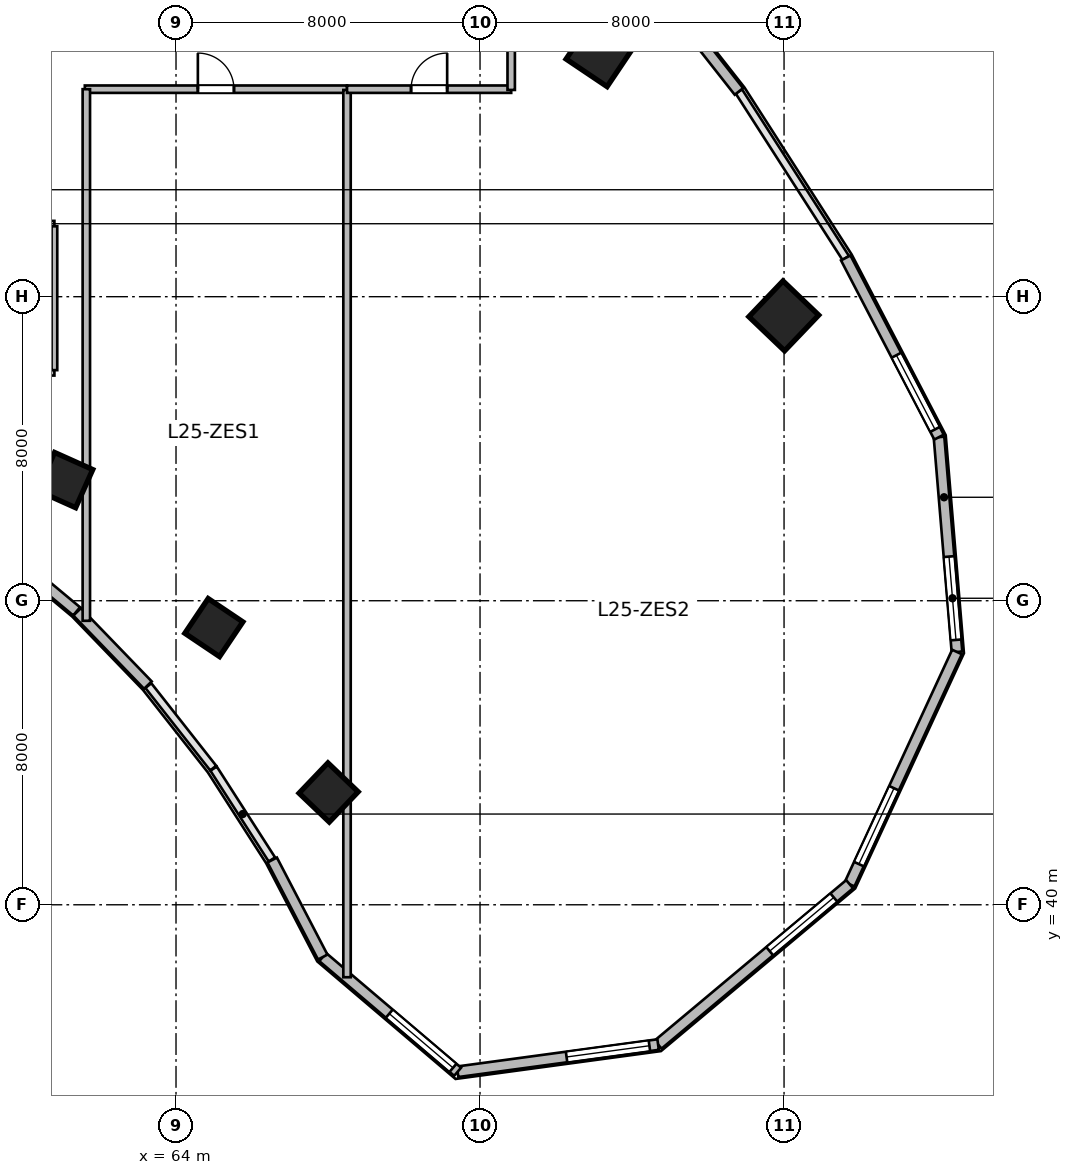
"""IFC4 building model, lengths in metres.
Left out: names, types, materials, properties, quantities, classifications, styles, units other than length and angle.
Written with IfcOpenShell. Run it as: python <this file> out.ifc"""

import sys

from ifc_helpers import new_model, si_unit, direction, frame, frame_2d, origin, origin_2d, place, context, subcontext, project, spatial, rectangle, extrude, source, transform, mapped, element, fill, save


model = new_model("IFC4")
c1 = context("Model", 3, precision=1e-05, world=origin(), true_north=direction((0.0, 1.0)))
c2 = subcontext(c1, "Body", "Model", "MODEL_VIEW")
j1 = project(units=[si_unit("LENGTHUNIT", "METRE"), si_unit("PLANEANGLEUNIT", "RADIAN")], contexts=[c1])
p1 = place(None, origin())
s1 = spatial("IfcSite", under=j1, at=p1, CompositionType="ELEMENT")
p2 = place(p1, origin())
s2 = spatial("IfcBuilding", under=s1, at=p2, CompositionType="ELEMENT")
p3 = place(p2, frame((0.0, 0.0, 107.7)))
s3 = spatial("IfcBuildingStorey", under=s2, at=p3, CompositionType="ELEMENT", Elevation=107.7)
m1 = source(origin(), c2, "Body", "SweptSolid", [
    extrude(rectangle(XDim=1.1, YDim=1.1, at=origin_2d()), origin(), (0.0, 0.0, 1.0), 3.9),
])
for number, where, z_axis, x_axis in (
    (1, (61.082, 51.175, 0.0), (0.0, 0.0, 1.0), (0.409, 0.912, 0.0)),
    (2, (64.996, 47.294, 0.0), (0.0, 0.0, 1.0), (0.558, 0.83, 0.0)),
):
    element("IfcColumn", number, at=place(p3, frame(where, z_axis=z_axis, x_axis=x_axis)), inside=s3, PredefinedType="COLUMN", context=c2, shape_type="MappedRepresentation", body=[
        mapped(m1, transform((0.0, 0.0, 0.0), scale=1.0)),
    ])
m2 = source(origin(), c2, "Body", "SweptSolid", [
    extrude(rectangle(XDim=1.3, YDim=1.3, at=origin_2d()), origin(), (0.0, 0.0, 1.0), 3.9),
])
p4 = place(p3, frame((75.167, 62.43, 0.0), z_axis=(0.0, 0.0, 1.0), x_axis=(0.55774510898, 0.830012285095, 0.0)))
e3 = element("IfcColumn", 3, at=p4, inside=s3, PredefinedType="COLUMN", context=c2, shape_type="MappedRepresentation", body=[
    mapped(m2, transform((0.0, 0.0, 0.0), scale=1.0)),
])
p5 = place(p3, frame((68.015, 42.955, 0.0), z_axis=(0.0, 0.0, 1.0), x_axis=(0.690756218984, 0.723087716626, 0.0)))
e4 = element("IfcColumn", 4, at=p5, inside=s3, PredefinedType="COLUMN", context=c2, shape_type="MappedRepresentation", body=[
    mapped(m1, transform((0.0, 0.0, 0.0), scale=1.0)),
])
p6 = place(p3, frame((79.993, 55.494, 0.0), z_axis=(0.0, 0.0, 1.0), x_axis=(0.690756218984, 0.723087716626, 0.0)))
e5 = element("IfcColumn", 5, at=p6, inside=s3, PredefinedType="COLUMN", context=c2, shape_type="MappedRepresentation", body=[
    mapped(m2, transform((0.0, 0.0, 0.0), scale=1.0)),
])
m3 = source(origin(), c2, "Body", "SweptSolid", [
    extrude(rectangle(XDim=5.674, YDim=0.28, at=frame_2d((2.837, 0.0))), origin(), (0.0, 0.0, 1.0), 3.65),
])
p7 = place(p3, frame((84.078, 52.305, 0.0), z_axis=(0.0, 0.0, 1.0), x_axis=(0.083309007867, -0.996523762491, 0.0)))
e6 = element("IfcWall", 6, at=p7, inside=s3, PredefinedType="SOLIDWALL", context=c2, shape_type="MappedRepresentation", body=[
    mapped(m3, transform((0.0, 0.0, 0.0), scale=1.0)),
])
p8 = place(p7, frame((3.155, 0.0, 0.95)))
e7 = element("IfcOpeningElement", 7, at=p8, cuts=e6, PredefinedType="OPENING", context=c2, shape_type="SweptSolid", body=[
    extrude(rectangle(XDim=2.2, YDim=2.1, at=frame_2d((1.1, 1.05))), frame((0.0, 0.15, 0.0), z_axis=(0.0, -1.0, 0.0), x_axis=(1.0, 0.0, 0.0)), (0.0, 0.0, 1.0), 0.3),
])
m4 = source(origin(), c2, "Body", "SweptSolid", [
    extrude(rectangle(XDim=6.732, YDim=0.28, at=frame_2d((3.366, 0.0))), origin(), (0.0, 0.0, 1.0), 3.65),
])
p9 = place(p3, frame((84.55, 46.652, 0.0), z_axis=(0.0, 0.0, 1.0), x_axis=(-0.419644552709, -0.907688520023, 0.0)))
e8 = element("IfcWall", 8, at=p9, inside=s3, PredefinedType="SOLIDWALL", context=c2, shape_type="MappedRepresentation", body=[
    mapped(m4, transform((0.0, 0.0, 0.0), scale=1.0)),
])
p10 = place(p9, frame((3.949, 0.0, 0.95)))
e9 = element("IfcOpeningElement", 9, at=p10, cuts=e8, PredefinedType="OPENING", context=c2, shape_type="SweptSolid", body=[
    extrude(rectangle(XDim=2.2, YDim=2.1, at=frame_2d((1.1, 1.05))), frame((0.0, 0.15, 0.0), z_axis=(0.0, -1.0, 0.0), x_axis=(1.0, 0.0, 0.0)), (0.0, 0.0, 1.0), 0.3),
])
m5 = source(origin(), c2, "Body", "SweptSolid", [
    extrude(rectangle(XDim=6.573, YDim=0.28, at=frame_2d((3.287, 0.0))), origin(), (0.0, 0.0, 1.0), 3.65),
])
p11 = place(p3, frame((81.725, 40.541, 0.0), z_axis=(0.0, 0.0, 1.0), x_axis=(-0.766715154163, -0.641987439423, 0.0)))
e10 = element("IfcWall", 10, at=p11, inside=s3, PredefinedType="SOLIDWALL", context=c2, shape_type="MappedRepresentation", body=[
    mapped(m5, transform((0.0, 0.0, 0.0), scale=1.0)),
])
p12 = place(p11, frame((0.543, 0.0, 0.95)))
e11 = element("IfcOpeningElement", 11, at=p12, cuts=e10, PredefinedType="OPENING", context=c2, shape_type="SweptSolid", body=[
    extrude(rectangle(XDim=2.2, YDim=2.1, at=frame_2d((1.1, 1.05))), frame((0.0, 0.15, 0.0), z_axis=(0.0, -1.0, 0.0), x_axis=(1.0, 0.0, 0.0)), (0.0, 0.0, 1.0), 0.3),
])
m6 = source(origin(), c2, "Body", "SweptSolid", [
    extrude(rectangle(XDim=5.324, YDim=0.28, at=frame_2d((2.662, 0.0))), origin(), (0.0, 0.0, 1.0), 3.65),
])
p13 = place(p3, frame((76.686, 36.322, 0.0), z_axis=(0.0, 0.0, 1.0), x_axis=(-0.990931467223, -0.134368252451, 0.0)))
e12 = element("IfcWall", 12, at=p13, inside=s3, PredefinedType="SOLIDWALL", context=c2, shape_type="MappedRepresentation", body=[
    mapped(m6, transform((0.0, 0.0, 0.0), scale=1.0)),
])
p14 = place(p13, frame((0.231, 0.0, 0.95)))
e13 = element("IfcOpeningElement", 13, at=p14, cuts=e12, PredefinedType="OPENING", context=c2, shape_type="SweptSolid", body=[
    extrude(rectangle(XDim=2.2, YDim=2.1, at=frame_2d((1.1, 1.05))), frame((0.0, 0.15, 0.0), z_axis=(0.0, -1.0, 0.0), x_axis=(1.0, 0.0, 0.0)), (0.0, 0.0, 1.0), 0.3),
])
m7 = source(origin(), c2, "Body", "SweptSolid", [
    extrude(rectangle(XDim=4.659, YDim=0.28, at=frame_2d((2.33, 0.0))), origin(), (0.0, 0.0, 1.0), 3.65),
])
p15 = place(p3, frame((71.41, 35.606, 0.0), z_axis=(0.0, 0.0, 1.0), x_axis=(-0.761913458795, 0.647678841176, 0.0)))
e14 = element("IfcWall", 14, at=p15, inside=s3, PredefinedType="SOLIDWALL", context=c2, shape_type="MappedRepresentation", body=[
    mapped(m7, transform((0.0, 0.0, 0.0), scale=1.0)),
])
p16 = place(p15, frame((0.16, 0.0, 0.95)))
e15 = element("IfcOpeningElement", 15, at=p16, cuts=e14, PredefinedType="OPENING", context=c2, shape_type="SweptSolid", body=[
    extrude(rectangle(XDim=2.2, YDim=2.1, at=frame_2d((1.1, 1.05))), frame((0.0, 0.15, 0.0), z_axis=(0.0, -1.0, 0.0), x_axis=(1.0, 0.0, 0.0)), (0.0, 0.0, 1.0), 0.3),
])
m8 = source(origin(), c2, "Body", "SweptSolid", [
    extrude(rectangle(XDim=2.88, YDim=0.28, at=frame_2d((1.44, 0.0))), origin(), (0.0, 0.0, 1.0), 3.65),
])
p17 = place(p3, frame((67.861, 38.624, 0.0), z_axis=(0.0, 0.0, 1.0), x_axis=(-0.461769086658, 0.887000175088, 0.0)))
e16 = element("IfcWall", 16, at=p17, inside=s3, PredefinedType="SOLIDWALL", context=c2, shape_type="MappedRepresentation", body=[
    mapped(m8, transform((0.0, 0.0, 0.0), scale=1.0)),
])
m9 = source(origin(), c2, "Body", "SweptSolid", [
    extrude(rectangle(XDim=2.68, YDim=0.28, at=frame_2d((1.34, 0.0))), origin(), (0.0, 0.0, 1.0), 3.65),
])
p18 = place(p3, frame((63.26, 45.78, 0.0), z_axis=(0.0, 0.0, 1.0), x_axis=(-0.694561996568, 0.719432855049, 0.0)))
e17 = element("IfcWall", 17, at=p18, inside=s3, PredefinedType="SOLIDWALL", context=c2, shape_type="MappedRepresentation", body=[
    mapped(m9, transform((0.0, 0.0, 0.0), scale=1.0)),
])
m10 = source(origin(), c2, "Body", "SweptSolid", [
    extrude(rectangle(XDim=2.601, YDim=0.28, at=frame_2d((1.3, 0.0))), origin(), (0.0, 0.0, 1.0), 3.65),
])
p19 = place(p3, frame((61.385, 47.721, 0.0), z_axis=(0.0, 0.0, 1.0), x_axis=(-0.76796730295, 0.640489048775, 0.0)))
e18 = element("IfcWall", 18, at=p19, inside=s3, PredefinedType="SOLIDWALL", context=c2, shape_type="MappedRepresentation", body=[
    mapped(m10, transform((0.0, 0.0, 0.0), scale=1.0)),
])
m11 = source(origin(), c2, "Body", "SweptSolid", [
    extrude(rectangle(XDim=5.058, YDim=0.28, at=frame_2d((2.529, 0.0))), origin(), (0.0, 0.0, 1.0), 3.65),
])
p20 = place(p3, frame((75.685, 65.376, 0.0), z_axis=(0.0, 0.0, 1.0), x_axis=(0.618145507434, -0.786063694391, 0.0)))
e19 = element("IfcWall", 19, at=p20, inside=s3, PredefinedType="SOLIDWALL", context=c2, shape_type="MappedRepresentation", body=[
    mapped(m11, transform((0.0, 0.0, 0.0), scale=1.0)),
])
m12 = source(origin(), c2, "Body", "SweptSolid", [
    extrude(rectangle(XDim=5.315, YDim=0.28, at=frame_2d((2.658, 0.0))), origin(), (0.0, 0.0, 1.0), 3.65),
])
p21 = place(p3, frame((81.623, 57.02, 0.0), z_axis=(0.0, 0.0, 1.0), x_axis=(0.461760527822, -0.887004630735, 0.0)))
e20 = element("IfcWall", 20, at=p21, inside=s3, PredefinedType="SOLIDWALL", context=c2, shape_type="MappedRepresentation", body=[
    mapped(m12, transform((0.0, 0.0, 0.0), scale=1.0)),
])
p22 = place(p21, frame((2.886, 0.0, 0.95)))
e21 = element("IfcOpeningElement", 21, at=p22, cuts=e20, PredefinedType="OPENING", context=c2, shape_type="SweptSolid", body=[
    extrude(rectangle(XDim=2.2, YDim=2.1, at=frame_2d((1.1, 1.05))), frame((0.0, 0.15, 0.0), z_axis=(0.0, -1.0, 0.0), x_axis=(1.0, 0.0, 0.0)), (0.0, 0.0, 1.0), 0.3),
])
m13 = source(origin(), c2, "Body", "SweptSolid", [
    extrude(rectangle(XDim=6.6, YDim=0.15, at=frame_2d((3.3, 0.0))), origin(), (0.0, 0.0, 1.0), 3.095),
])
p23 = place(p3, frame((54.2, 54.0, 0.0), z_axis=(0.0, 0.0, 1.0), x_axis=(1.0, 0.0, 0.0)))
e22 = element("IfcWall", 22, at=p23, inside=s3, PredefinedType="PARTITIONING", context=c2, shape_type="MappedRepresentation", body=[
    mapped(m13, transform((0.0, 0.0, 0.0), scale=1.0)),
])
m14 = source(origin(), c2, "Body", "SweptSolid", [
    extrude(rectangle(XDim=6.6, YDim=0.15, at=frame_2d((3.3, 0.0))), origin(), (0.0, 0.0, 1.0), 3.65),
])
p24 = place(p3, frame((54.2, 57.92, 0.0), z_axis=(0.0, 0.0, 1.0), x_axis=(1.0, 0.0, 0.0)))
e23 = element("IfcWall", 23, at=p24, inside=s3, PredefinedType="PARTITIONING", context=c2, shape_type="MappedRepresentation", body=[
    mapped(m14, transform((0.0, 0.0, 0.0), scale=1.0)),
])
p25 = place(p24, frame((2.825, 0.0, 0.0)))
e24 = element("IfcOpeningElement", 24, at=p25, cuts=e23, PredefinedType="OPENING", context=c2, shape_type="SweptSolid", body=[
    extrude(rectangle(XDim=0.95, YDim=2.1, at=frame_2d((0.475, 1.05))), frame((0.0, 0.085, 0.0), z_axis=(0.0, -1.0, 0.0), x_axis=(1.0, 0.0, 0.0)), (0.0, 0.0, 1.0), 0.17),
])
m15 = source(origin(), c2, "Body", "SweptSolid", [
    extrude(rectangle(XDim=3.785, YDim=0.15, at=frame_2d((1.893, 0.0))), origin(), (0.0, 0.0, 1.0), 3.65),
])
p26 = place(p3, frame((60.8, 54.067, 0.0), z_axis=(0.0, 0.0, 1.0), x_axis=(0.0, 1.0, 0.0)))
e25 = element("IfcWall", 25, at=p26, inside=s3, PredefinedType="PARTITIONING", context=c2, shape_type="MappedRepresentation", body=[
    mapped(m15, transform((0.0, 0.0, 0.0), scale=1.0)),
])
m16 = source(origin(), c2, "Body", "SweptSolid", [
    extrude(rectangle(XDim=6.9, YDim=0.195, at=frame_2d((3.45, 0.0))), origin(), (0.0, 0.0, 1.0), 3.65),
])
p27 = place(p3, frame((61.6, 61.46, 0.0), z_axis=(0.0, 0.0, 1.0), x_axis=(1.0, 0.0, 0.0)))
e26 = element("IfcWall", 26, at=p27, inside=s3, PredefinedType="PARTITIONING", context=c2, shape_type="MappedRepresentation", body=[
    mapped(m16, transform((0.0, 0.0, 0.0), scale=1.0)),
])
p28 = place(p27, frame((2.975, 0.0, 0.0)))
e27 = element("IfcOpeningElement", 27, at=p28, cuts=e26, PredefinedType="OPENING", context=c2, shape_type="SweptSolid", body=[
    extrude(rectangle(XDim=0.95, YDim=2.1, at=frame_2d((0.475, 1.05))), frame((0.0, 0.107, 0.0), z_axis=(0.0, -1.0, 0.0), x_axis=(1.0, 0.0, 0.0)), (0.0, 0.0, 1.0), 0.215),
])
m17 = source(origin(), c2, "Body", "SweptSolid", [
    extrude(rectangle(XDim=23.346, YDim=0.195, at=frame_2d((11.673, 0.0))), origin(), (0.0, 0.0, 1.0), 2.942),
])
p29 = place(p3, frame((68.5, 38.094, 0.0), z_axis=(0.0, 0.0, 1.0), x_axis=(0.0, 1.0, 0.0)))
e28 = element("IfcWall", 28, at=p29, inside=s3, PredefinedType="PARTITIONING", context=c2, shape_type="MappedRepresentation", body=[
    mapped(m17, transform((0.0, 0.0, 0.0), scale=1.0)),
])
m18 = source(origin(), c2, "Body", "SweptSolid", [
    extrude(rectangle(XDim=4.32, YDim=0.195, at=frame_2d((2.16, 0.0))), origin(), (0.0, 0.0, 1.0), 3.65),
])
p30 = place(p3, frame((68.5, 61.46, 0.0), z_axis=(0.0, 0.0, 1.0), x_axis=(1.0, 0.0, 0.0)))
e29 = element("IfcWall", 29, at=p30, inside=s3, PredefinedType="PARTITIONING", context=c2, shape_type="MappedRepresentation", body=[
    mapped(m18, transform((0.0, 0.0, 0.0), scale=1.0)),
])
p31 = place(p30, frame((1.685, 0.0, 0.0)))
e30 = element("IfcOpeningElement", 30, at=p31, cuts=e29, PredefinedType="OPENING", context=c2, shape_type="SweptSolid", body=[
    extrude(rectangle(XDim=0.95, YDim=2.1, at=frame_2d((0.475, 1.05))), frame((0.0, 0.107, 0.0), z_axis=(0.0, -1.0, 0.0), x_axis=(1.0, 0.0, 0.0)), (0.0, 0.0, 1.0), 0.215),
])
m19 = source(origin(), c2, "Body", "SweptSolid", [
    extrude(rectangle(XDim=13.988, YDim=0.195, at=frame_2d((6.994, 0.0))), origin(), (0.0, 0.0, 1.0), 2.942),
])
p32 = place(p3, frame((61.64, 47.472, 0.0), z_axis=(0.0, 0.0, 1.0), x_axis=(0.0, 1.0, 0.0)))
e31 = element("IfcWall", 31, at=p32, inside=s3, PredefinedType="PARTITIONING", context=c2, shape_type="MappedRepresentation", body=[
    mapped(m19, transform((0.0, 0.0, 0.0), scale=1.0)),
])
m20 = source(origin(), c2, "Body", "SweptSolid", [
    extrude(rectangle(XDim=2.62, YDim=0.195, at=frame_2d((1.31, 0.0))), origin(), (0.0, 0.0, 1.0), 3.324),
])
p33 = place(p3, frame((72.82, 61.44, 0.0), z_axis=(0.0, 0.0, 1.0), x_axis=(0.0, 1.0, 0.0)))
e32 = element("IfcWall", 32, at=p33, inside=s3, PredefinedType="PARTITIONING", context=c2, shape_type="MappedRepresentation", body=[
    mapped(m20, transform((0.0, 0.0, 0.0), scale=1.0)),
])
m21 = source(origin(), c2, "Body", "SweptSolid", [
    extrude(rectangle(XDim=2.2, YDim=2.1, at=frame_2d((1.1, 1.05))), frame((0.0, 0.03, 0.0), z_axis=(0.0, -1.0, 0.0), x_axis=(1.0, 0.0, 0.0)), (0.0, 0.0, 1.0), 0.06),
])
p34 = place(p8, origin())
e33 = element("IfcWindow", 33, at=p34, inside=s3, PartitioningType="TRIPLE_PANEL_VERTICAL", PredefinedType="WINDOW", context=c2, shape_type="MappedRepresentation", body=[
    mapped(m21, transform((0.0, 0.0, 0.0), scale=1.0)),
])
fill(e7, e33)
p35 = place(p10, origin())
e34 = element("IfcWindow", 34, at=p35, inside=s3, PartitioningType="TRIPLE_PANEL_VERTICAL", PredefinedType="WINDOW", context=c2, shape_type="MappedRepresentation", body=[
    mapped(m21, transform((0.0, 0.0, 0.0), scale=1.0)),
])
fill(e9, e34)
p36 = place(p12, origin())
e35 = element("IfcWindow", 35, at=p36, inside=s3, PartitioningType="TRIPLE_PANEL_VERTICAL", PredefinedType="WINDOW", context=c2, shape_type="MappedRepresentation", body=[
    mapped(m21, transform((0.0, 0.0, 0.0), scale=1.0)),
])
fill(e11, e35)
p37 = place(p14, origin())
e36 = element("IfcWindow", 36, at=p37, inside=s3, PartitioningType="TRIPLE_PANEL_VERTICAL", PredefinedType="WINDOW", context=c2, shape_type="MappedRepresentation", body=[
    mapped(m21, transform((0.0, 0.0, 0.0), scale=1.0)),
])
fill(e13, e36)
p38 = place(p16, origin())
e37 = element("IfcWindow", 37, at=p38, inside=s3, PartitioningType="TRIPLE_PANEL_VERTICAL", PredefinedType="WINDOW", context=c2, shape_type="MappedRepresentation", body=[
    mapped(m21, transform((0.0, 0.0, 0.0), scale=1.0)),
])
fill(e15, e37)
p39 = place(p22, origin())
e38 = element("IfcWindow", 38, at=p39, inside=s3, PartitioningType="TRIPLE_PANEL_VERTICAL", PredefinedType="WINDOW", context=c2, shape_type="MappedRepresentation", body=[
    mapped(m21, transform((0.0, 0.0, 0.0), scale=1.0)),
])
fill(e21, e38)
m22 = source(origin(), c2, "Body", "SweptSolid", [
    extrude(rectangle(XDim=0.95, YDim=2.1, at=frame_2d((0.475, 1.05))), frame((0.0, 0.025, 0.0), z_axis=(0.0, -1.0, 0.0), x_axis=(1.0, 0.0, 0.0)), (0.0, 0.0, 1.0), 0.05),
])
p40 = place(p28, origin())
e39 = element("IfcDoor", 39, at=p40, inside=s3, OperationType="SINGLE_SWING_LEFT", PredefinedType="DOOR", context=c2, shape_type="MappedRepresentation", body=[
    mapped(m22, transform((0.0, 0.0, 0.0), scale=1.0)),
])
fill(e27, e39)
p41 = place(p31, origin())
e40 = element("IfcDoor", 40, at=p41, inside=s3, OperationType="SINGLE_SWING_RIGHT", PredefinedType="DOOR", context=c2, shape_type="MappedRepresentation", body=[
    mapped(m22, transform((0.0, 0.0, 0.0), scale=1.0)),
])
fill(e30, e40)
save(model, sys.argv[1])
